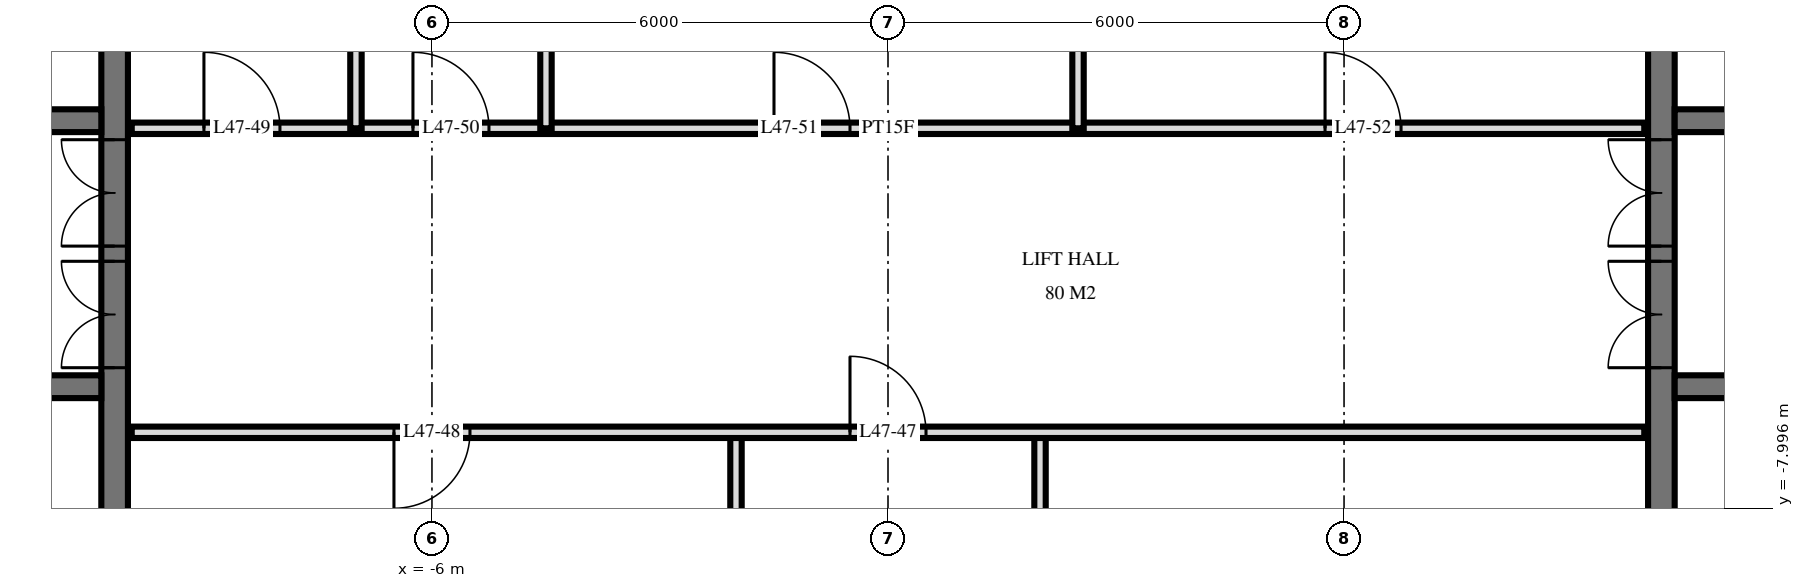
"""IFC4 building model, lengths in metres.
Left out: names, types, materials, properties, quantities, classifications, styles, units other than length and angle.
Written with IfcOpenShell. Run it as: python <this file> out.ifc"""

import sys

from ifc_helpers import new_model, si_unit, direction, frame, frame_2d, origin, place, context, subcontext, project, spatial, rectangle, extrude, element, fill, save


model = new_model("IFC4")
c1 = context("Model", 3, precision=1e-05, world=origin(), true_north=direction((0.0, 1.0)))
c2 = subcontext(c1, "Body", "Model", "MODEL_VIEW")
j1 = project(units=[si_unit("LENGTHUNIT", "METRE"), si_unit("PLANEANGLEUNIT", "RADIAN")], contexts=[c1])
p1 = place(None, origin())
s1 = spatial("IfcSite", under=j1, at=p1, CompositionType="ELEMENT")
p2 = place(p1, origin())
s2 = spatial("IfcBuilding", under=s1, at=p2, CompositionType="ELEMENT")
p3 = place(p2, frame((0.0, 0.0, 183.6)))
s3 = spatial("IfcBuildingStorey", under=s2, at=p3, CompositionType="ELEMENT", Elevation=183.6)
p4 = place(p3, frame((-10.175, -14.55, 0.0), z_axis=(0.0, 0.0, 1.0), x_axis=(0.0, 1.0, 0.0)))
e1 = element("IfcWall", 1, at=p4, inside=s3, PredefinedType="SHEAR", context=c2, shape_type="SweptSolid", body=[
    extrude(rectangle(XDim=14.1, YDim=0.35, at=frame_2d((7.05, 0.0))), origin(), (0.0, 0.0, 1.0), 3.5),
])
p5 = place(p4, frame((8.4, 0.0, 0.0)))
e2 = element("IfcOpeningElement", 2, at=p5, cuts=e1, PredefinedType="OPENING", context=c2, shape_type="SweptSolid", body=[
    extrude(rectangle(XDim=1.4, YDim=2.4, at=frame_2d((0.7, 1.2))), frame((0.0, 0.185, 0.0), z_axis=(0.0, -1.0, 0.0), x_axis=(1.0, 0.0, 0.0)), (0.0, 0.0, 1.0), 0.37),
])
p6 = place(p4, frame((10.0, 0.0, 0.0)))
e3 = element("IfcOpeningElement", 3, at=p6, cuts=e1, PredefinedType="OPENING", context=c2, shape_type="SweptSolid", body=[
    extrude(rectangle(XDim=1.4, YDim=2.4, at=frame_2d((0.7, 1.2))), frame((0.0, 0.185, 0.0), z_axis=(0.0, -1.0, 0.0), x_axis=(1.0, 0.0, 0.0)), (0.0, 0.0, 1.0), 0.37),
])
p7 = place(p4, frame((4.0, 0.0, 0.0)))
e4 = element("IfcOpeningElement", 4, at=p7, cuts=e1, PredefinedType="OPENING", context=c2, shape_type="SweptSolid", body=[
    extrude(rectangle(XDim=1.2, YDim=2.1, at=frame_2d((0.6, 1.05))), frame((0.0, 0.185, 0.0), z_axis=(0.0, -1.0, 0.0), x_axis=(1.0, 0.0, 0.0)), (0.0, 0.0, 1.0), 0.37),
])
p8 = place(p3, frame((-24.05, -2.9, 0.0), z_axis=(0.0, 0.0, 1.0), x_axis=(1.0, 0.0, 0.0)))
e5 = element("IfcWall", 5, at=p8, inside=s3, PredefinedType="SHEAR", context=c2, shape_type="SweptSolid", body=[
    extrude(rectangle(XDim=13.7, YDim=0.3, at=frame_2d((6.85, 0.0))), origin(), (0.0, 0.0, 1.0), 3.5),
])
p9 = place(p8, frame((0.55, 0.0, 0.0)))
e6 = element("IfcOpeningElement", 6, at=p9, cuts=e5, PredefinedType="OPENING", context=c2, shape_type="SweptSolid", body=[
    extrude(rectangle(XDim=1.1, YDim=2.1, at=frame_2d((0.55, 1.05))), frame((0.0, 0.16, 0.0), z_axis=(0.0, -1.0, 0.0), x_axis=(1.0, 0.0, 0.0)), (0.0, 0.0, 1.0), 0.32),
])
p10 = place(p8, frame((5.9, 0.0, 0.0)))
e7 = element("IfcOpeningElement", 7, at=p10, cuts=e5, PredefinedType="OPENING", context=c2, shape_type="SweptSolid", body=[
    extrude(rectangle(XDim=0.9, YDim=2.1, at=frame_2d((0.45, 1.05))), frame((0.0, 0.16, 0.0), z_axis=(0.0, -1.0, 0.0), x_axis=(1.0, 0.0, 0.0)), (0.0, 0.0, 1.0), 0.32),
])
p11 = place(p8, frame((11.85, 0.0, 0.0)))
e8 = element("IfcOpeningElement", 8, at=p11, cuts=e5, PredefinedType="OPENING", context=c2, shape_type="SweptSolid", body=[
    extrude(rectangle(XDim=1.0, YDim=2.1, at=frame_2d((0.5, 1.05))), frame((0.0, 0.16, 0.0), z_axis=(0.0, -1.0, 0.0), x_axis=(1.0, 0.0, 0.0)), (0.0, 0.0, 1.0), 0.32),
])
p12 = place(p8, frame((9.312, 0.0, 0.0)))
e9 = element("IfcOpeningElement", 9, at=p12, cuts=e5, PredefinedType="OPENING", context=c2, shape_type="SweptSolid", body=[
    extrude(rectangle(XDim=1.0, YDim=2.1, at=frame_2d((0.5, 1.05))), frame((0.0, 0.16, 0.0), z_axis=(0.0, -1.0, 0.0), x_axis=(1.0, 0.0, 0.0)), (0.0, 0.0, 1.0), 0.32),
])
p13 = place(p8, frame((7.887, 0.0, 0.0)))
e10 = element("IfcOpeningElement", 10, at=p13, cuts=e5, PredefinedType="OPENING", context=c2, shape_type="SweptSolid", body=[
    extrude(rectangle(XDim=1.0, YDim=2.1, at=frame_2d((0.5, 1.05))), frame((0.0, 0.16, 0.0), z_axis=(0.0, -1.0, 0.0), x_axis=(1.0, 0.0, 0.0)), (0.0, 0.0, 1.0), 0.32),
])
p14 = place(p8, frame((3.0, 0.0, 0.0)))
e11 = element("IfcOpeningElement", 11, at=p14, cuts=e5, PredefinedType="OPENING", context=c2, shape_type="SweptSolid", body=[
    extrude(rectangle(XDim=1.0, YDim=2.1, at=frame_2d((0.5, 1.05))), frame((0.0, 0.16, 0.0), z_axis=(0.0, -1.0, 0.0), x_axis=(1.0, 0.0, 0.0)), (0.0, 0.0, 1.0), 0.32),
])
p15 = place(p3, frame((-24.05, -6.4, 0.0), z_axis=(0.0, 0.0, 1.0), x_axis=(1.0, 0.0, 0.0)))
e12 = element("IfcWall", 12, at=p15, inside=s3, PredefinedType="SHEAR", context=c2, shape_type="SweptSolid", body=[
    extrude(rectangle(XDim=13.7, YDim=0.3, at=frame_2d((6.85, 0.0))), origin(), (0.0, 0.0, 1.0), 3.5),
])
p16 = place(p15, frame((0.55, 0.0, 0.0)))
e13 = element("IfcOpeningElement", 13, at=p16, cuts=e12, PredefinedType="OPENING", context=c2, shape_type="SweptSolid", body=[
    extrude(rectangle(XDim=1.1, YDim=2.1, at=frame_2d((0.55, 1.05))), frame((0.0, 0.16, 0.0), z_axis=(0.0, -1.0, 0.0), x_axis=(1.0, 0.0, 0.0)), (0.0, 0.0, 1.0), 0.32),
])
p17 = place(p15, frame((5.8, 0.0, 0.0)))
e14 = element("IfcOpeningElement", 14, at=p17, cuts=e12, PredefinedType="OPENING", context=c2, shape_type="SweptSolid", body=[
    extrude(rectangle(XDim=1.1, YDim=2.1, at=frame_2d((0.55, 1.05))), frame((0.0, 0.16, 0.0), z_axis=(0.0, -1.0, 0.0), x_axis=(1.0, 0.0, 0.0)), (0.0, 0.0, 1.0), 0.32),
])
p18 = place(p3, frame((10.175, -14.55, 0.0), z_axis=(0.0, 0.0, 1.0), x_axis=(0.0, 1.0, 0.0)))
e15 = element("IfcWall", 15, at=p18, inside=s3, PredefinedType="SHEAR", context=c2, shape_type="SweptSolid", body=[
    extrude(rectangle(XDim=14.1, YDim=0.35, at=frame_2d((7.05, 0.0))), origin(), (0.0, 0.0, 1.0), 3.5),
])
p19 = place(p18, frame((8.4, 0.0, 0.0)))
e16 = element("IfcOpeningElement", 16, at=p19, cuts=e15, PredefinedType="OPENING", context=c2, shape_type="SweptSolid", body=[
    extrude(rectangle(XDim=1.4, YDim=2.4, at=frame_2d((0.7, 1.2))), frame((0.0, 0.185, 0.0), z_axis=(0.0, -1.0, 0.0), x_axis=(1.0, 0.0, 0.0)), (0.0, 0.0, 1.0), 0.37),
])
p20 = place(p18, frame((10.0, 0.0, 0.0)))
e17 = element("IfcOpeningElement", 17, at=p20, cuts=e15, PredefinedType="OPENING", context=c2, shape_type="SweptSolid", body=[
    extrude(rectangle(XDim=1.4, YDim=2.4, at=frame_2d((0.7, 1.2))), frame((0.0, 0.185, 0.0), z_axis=(0.0, -1.0, 0.0), x_axis=(1.0, 0.0, 0.0)), (0.0, 0.0, 1.0), 0.37),
])
p21 = place(p18, frame((4.0, 0.0, 0.0)))
e18 = element("IfcOpeningElement", 18, at=p21, cuts=e15, PredefinedType="OPENING", context=c2, shape_type="SweptSolid", body=[
    extrude(rectangle(XDim=1.2, YDim=2.1, at=frame_2d((0.6, 1.05))), frame((0.0, 0.185, 0.0), z_axis=(0.0, -1.0, 0.0), x_axis=(1.0, 0.0, 0.0)), (0.0, 0.0, 1.0), 0.37),
])
p22 = place(p3, frame((10.35, -2.9, 0.0), z_axis=(0.0, 0.0, 1.0), x_axis=(1.0, 0.0, 0.0)))
e19 = element("IfcWall", 19, at=p22, inside=s3, PredefinedType="SHEAR", context=c2, shape_type="SweptSolid", body=[
    extrude(rectangle(XDim=13.7, YDim=0.3, at=frame_2d((6.85, 0.0))), origin(), (0.0, 0.0, 1.0), 3.5),
])
p23 = place(p22, frame((12.05, 0.0, 0.0)))
e20 = element("IfcOpeningElement", 20, at=p23, cuts=e19, PredefinedType="OPENING", context=c2, shape_type="SweptSolid", body=[
    extrude(rectangle(XDim=1.1, YDim=2.1, at=frame_2d((0.55, 1.05))), frame((0.0, 0.16, 0.0), z_axis=(0.0, -1.0, 0.0), x_axis=(1.0, 0.0, 0.0)), (0.0, 0.0, 1.0), 0.32),
])
p24 = place(p22, frame((6.9, 0.0, 0.0)))
e21 = element("IfcOpeningElement", 21, at=p24, cuts=e19, PredefinedType="OPENING", context=c2, shape_type="SweptSolid", body=[
    extrude(rectangle(XDim=0.9, YDim=2.1, at=frame_2d((0.45, 1.05))), frame((0.0, 0.16, 0.0), z_axis=(0.0, -1.0, 0.0), x_axis=(1.0, 0.0, 0.0)), (0.0, 0.0, 1.0), 0.32),
])
p25 = place(p22, frame((0.85, 0.0, 0.0)))
e22 = element("IfcOpeningElement", 22, at=p25, cuts=e19, PredefinedType="OPENING", context=c2, shape_type="SweptSolid", body=[
    extrude(rectangle(XDim=1.0, YDim=2.1, at=frame_2d((0.5, 1.05))), frame((0.0, 0.16, 0.0), z_axis=(0.0, -1.0, 0.0), x_axis=(1.0, 0.0, 0.0)), (0.0, 0.0, 1.0), 0.32),
])
p26 = place(p22, frame((3.387, 0.0, 0.0)))
e23 = element("IfcOpeningElement", 23, at=p26, cuts=e19, PredefinedType="OPENING", context=c2, shape_type="SweptSolid", body=[
    extrude(rectangle(XDim=1.0, YDim=2.1, at=frame_2d((0.5, 1.05))), frame((0.0, 0.16, 0.0), z_axis=(0.0, -1.0, 0.0), x_axis=(1.0, 0.0, 0.0)), (0.0, 0.0, 1.0), 0.32),
])
p27 = place(p22, frame((4.812, 0.0, 0.0)))
e24 = element("IfcOpeningElement", 24, at=p27, cuts=e19, PredefinedType="OPENING", context=c2, shape_type="SweptSolid", body=[
    extrude(rectangle(XDim=1.0, YDim=2.1, at=frame_2d((0.5, 1.05))), frame((0.0, 0.16, 0.0), z_axis=(0.0, -1.0, 0.0), x_axis=(1.0, 0.0, 0.0)), (0.0, 0.0, 1.0), 0.32),
])
p28 = place(p22, frame((9.7, 0.0, 0.0)))
e25 = element("IfcOpeningElement", 25, at=p28, cuts=e19, PredefinedType="OPENING", context=c2, shape_type="SweptSolid", body=[
    extrude(rectangle(XDim=1.0, YDim=2.1, at=frame_2d((0.5, 1.05))), frame((0.0, 0.16, 0.0), z_axis=(0.0, -1.0, 0.0), x_axis=(1.0, 0.0, 0.0)), (0.0, 0.0, 1.0), 0.32),
])
p29 = place(p3, frame((10.35, -6.4, 0.0), z_axis=(0.0, 0.0, 1.0), x_axis=(1.0, 0.0, 0.0)))
e26 = element("IfcWall", 26, at=p29, inside=s3, PredefinedType="SHEAR", context=c2, shape_type="SweptSolid", body=[
    extrude(rectangle(XDim=13.7, YDim=0.3, at=frame_2d((6.85, 0.0))), origin(), (0.0, 0.0, 1.0), 3.5),
])
p30 = place(p29, frame((12.05, 0.0, 0.0)))
e27 = element("IfcOpeningElement", 27, at=p30, cuts=e26, PredefinedType="OPENING", context=c2, shape_type="SweptSolid", body=[
    extrude(rectangle(XDim=1.1, YDim=2.1, at=frame_2d((0.55, 1.05))), frame((0.0, 0.16, 0.0), z_axis=(0.0, -1.0, 0.0), x_axis=(1.0, 0.0, 0.0)), (0.0, 0.0, 1.0), 0.32),
])
p31 = place(p29, frame((6.8, 0.0, 0.0)))
e28 = element("IfcOpeningElement", 28, at=p31, cuts=e26, PredefinedType="OPENING", context=c2, shape_type="SweptSolid", body=[
    extrude(rectangle(XDim=1.1, YDim=2.1, at=frame_2d((0.55, 1.05))), frame((0.0, 0.16, 0.0), z_axis=(0.0, -1.0, 0.0), x_axis=(1.0, 0.0, 0.0)), (0.0, 0.0, 1.0), 0.32),
])
p32 = place(p3, frame((2.5, -3.0, 0.0), z_axis=(0.0, 0.0, 1.0), x_axis=(0.0, 1.0, 0.0)))
e29 = element("IfcWall", 29, at=p32, inside=s3, PredefinedType="PARTITIONING", context=c2, shape_type="SweptSolid", body=[
    extrude(rectangle(XDim=4.02, YDim=0.15, at=frame_2d((2.01, 0.0))), origin(), (0.0, 0.0, 1.0), 3.22),
])
for number, where, z_axis, x_axis in (
    (30, (2.0, -11.0, 0.0), (0.0, 0.0, 1.0), (0.0, 1.0, 0.0)),
    (31, (-2.0, -11.0, 0.0), (0.0, 0.0, 1.0), (0.0, 1.0, 0.0)),
):
    element("IfcWall", number, at=place(p3, frame(where, z_axis=z_axis, x_axis=x_axis)), inside=s3, PredefinedType="PARTITIONING", context=c2, shape_type="SweptSolid", body=[
        extrude(rectangle(XDim=4.0, YDim=0.15, at=frame_2d((2.0, 0.0))), origin(), (0.0, 0.0, 1.0), 3.22),
    ])
for number, where, z_axis, x_axis in (
    (32, (-4.5, -3.0, 0.0), (0.0, 0.0, 1.0), (0.0, 1.0, 0.0)),
    (33, (-7.0, -3.0, 0.0), (0.0, 0.0, 1.0), (0.0, 1.0, 0.0)),
):
    element("IfcWall", number, at=place(p3, frame(where, z_axis=z_axis, x_axis=x_axis)), inside=s3, PredefinedType="PLUMBINGWALL", context=c2, shape_type="SweptSolid", body=[
        extrude(rectangle(XDim=4.02, YDim=0.15, at=frame_2d((2.01, 0.0))), origin(), (0.0, 0.0, 1.0), 3.22),
    ])
p33 = place(p3, frame((-9.95, -7.0, 0.0), z_axis=(0.0, 0.0, 1.0), x_axis=(1.0, 0.0, 0.0)))
e34 = element("IfcWall", 34, at=p33, inside=s3, PredefinedType="PARTITIONING", context=c2, shape_type="SweptSolid", body=[
    extrude(rectangle(XDim=19.9, YDim=0.15, at=frame_2d((9.95, 0.0))), origin(), (0.0, 0.0, 1.0), 3.22),
])
p34 = place(p33, frame((9.45, 0.0, 0.0)))
e35 = element("IfcOpeningElement", 35, at=p34, cuts=e34, PredefinedType="OPENING", context=c2, shape_type="SweptSolid", body=[
    extrude(rectangle(XDim=1.0, YDim=2.1, at=frame_2d((0.5, 1.05))), frame((0.0, 0.085, 0.0), z_axis=(0.0, -1.0, 0.0), x_axis=(1.0, 0.0, 0.0)), (0.0, 0.0, 1.0), 0.17),
])
p35 = place(p33, frame((3.45, 0.0, 0.0)))
e36 = element("IfcOpeningElement", 36, at=p35, cuts=e34, PredefinedType="OPENING", context=c2, shape_type="SweptSolid", body=[
    extrude(rectangle(XDim=1.0, YDim=2.1, at=frame_2d((0.5, 1.05))), frame((0.0, 0.085, 0.0), z_axis=(0.0, -1.0, 0.0), x_axis=(1.0, 0.0, 0.0)), (0.0, 0.0, 1.0), 0.17),
])
p36 = place(p3, frame((-9.95, -3.0, 0.0), z_axis=(0.0, 0.0, 1.0), x_axis=(1.0, 0.0, 0.0)))
e37 = element("IfcWall", 37, at=p36, inside=s3, PredefinedType="PARTITIONING", context=c2, shape_type="SweptSolid", body=[
    extrude(rectangle(XDim=19.9, YDim=0.15, at=frame_2d((9.95, 0.0))), origin(), (0.0, 0.0, 1.0), 3.22),
])
p37 = place(p36, frame((0.95, 0.0, 0.0)))
e38 = element("IfcOpeningElement", 38, at=p37, cuts=e37, PredefinedType="OPENING", context=c2, shape_type="SweptSolid", body=[
    extrude(rectangle(XDim=1.0, YDim=2.1, at=frame_2d((0.5, 1.05))), frame((0.0, 0.085, 0.0), z_axis=(0.0, -1.0, 0.0), x_axis=(1.0, 0.0, 0.0)), (0.0, 0.0, 1.0), 0.17),
])
p38 = place(p36, frame((3.7, 0.0, 0.0)))
e39 = element("IfcOpeningElement", 39, at=p38, cuts=e37, PredefinedType="OPENING", context=c2, shape_type="SweptSolid", body=[
    extrude(rectangle(XDim=1.0, YDim=2.1, at=frame_2d((0.5, 1.05))), frame((0.0, 0.085, 0.0), z_axis=(0.0, -1.0, 0.0), x_axis=(1.0, 0.0, 0.0)), (0.0, 0.0, 1.0), 0.17),
])
p39 = place(p36, frame((8.45, 0.0, 0.0)))
e40 = element("IfcOpeningElement", 40, at=p39, cuts=e37, PredefinedType="OPENING", context=c2, shape_type="SweptSolid", body=[
    extrude(rectangle(XDim=1.0, YDim=2.1, at=frame_2d((0.5, 1.05))), frame((0.0, 0.085, 0.0), z_axis=(0.0, -1.0, 0.0), x_axis=(1.0, 0.0, 0.0)), (0.0, 0.0, 1.0), 0.17),
])
p40 = place(p36, frame((15.7, 0.0, 0.0)))
e41 = element("IfcOpeningElement", 41, at=p40, cuts=e37, PredefinedType="OPENING", context=c2, shape_type="SweptSolid", body=[
    extrude(rectangle(XDim=1.0, YDim=2.1, at=frame_2d((0.5, 1.05))), frame((0.0, 0.085, 0.0), z_axis=(0.0, -1.0, 0.0), x_axis=(1.0, 0.0, 0.0)), (0.0, 0.0, 1.0), 0.17),
])
p41 = place(p5, origin())
e42 = element("IfcDoor", 42, at=p41, inside=s3, OperationType="DOUBLE_DOOR_SINGLE_SWING", PredefinedType="DOOR", context=c2, shape_type="SweptSolid", body=[
    extrude(rectangle(XDim=1.4, YDim=2.4, at=frame_2d((0.7, 1.2))), frame((0.0, 0.025, 0.0), z_axis=(0.0, -1.0, 0.0), x_axis=(1.0, 0.0, 0.0)), (0.0, 0.0, 1.0), 0.05),
])
fill(e2, e42)
p42 = place(p6, origin())
e43 = element("IfcDoor", 43, at=p42, inside=s3, OperationType="DOUBLE_DOOR_SINGLE_SWING", PredefinedType="DOOR", context=c2, shape_type="SweptSolid", body=[
    extrude(rectangle(XDim=1.4, YDim=2.4, at=frame_2d((0.7, 1.2))), frame((0.0, 0.025, 0.0), z_axis=(0.0, -1.0, 0.0), x_axis=(1.0, 0.0, 0.0)), (0.0, 0.0, 1.0), 0.05),
])
fill(e3, e43)
p43 = place(p19, origin())
e44 = element("IfcDoor", 44, at=p43, inside=s3, OperationType="DOUBLE_DOOR_SINGLE_SWING", PredefinedType="DOOR", context=c2, shape_type="SweptSolid", body=[
    extrude(rectangle(XDim=1.4, YDim=2.4, at=frame_2d((0.7, 1.2))), frame((0.0, 0.025, 0.0), z_axis=(0.0, -1.0, 0.0), x_axis=(1.0, 0.0, 0.0)), (0.0, 0.0, 1.0), 0.05),
])
fill(e16, e44)
p44 = place(p20, origin())
e45 = element("IfcDoor", 45, at=p44, inside=s3, OperationType="DOUBLE_DOOR_SINGLE_SWING", PredefinedType="DOOR", context=c2, shape_type="SweptSolid", body=[
    extrude(rectangle(XDim=1.4, YDim=2.4, at=frame_2d((0.7, 1.2))), frame((0.0, 0.025, 0.0), z_axis=(0.0, -1.0, 0.0), x_axis=(1.0, 0.0, 0.0)), (0.0, 0.0, 1.0), 0.05),
])
fill(e17, e45)
p45 = place(p34, origin())
e46 = element("IfcDoor", 46, at=p45, inside=s3, OperationType="SINGLE_SWING_RIGHT", PredefinedType="DOOR", context=c2, shape_type="SweptSolid", body=[
    extrude(rectangle(XDim=1.0, YDim=2.1, at=frame_2d((0.5, 1.05))), frame((0.0, 0.025, 0.0), z_axis=(0.0, -1.0, 0.0), x_axis=(1.0, 0.0, 0.0)), (0.0, 0.0, 1.0), 0.05),
])
fill(e35, e46)
p46 = place(p35, frame((0.5, 0.0, 0.0), z_axis=(0.0, 0.0, 1.0), x_axis=(-1.0, 0.0, 0.0)))
e47 = element("IfcDoor", 47, at=p46, inside=s3, OperationType="SINGLE_SWING_LEFT", PredefinedType="DOOR", context=c2, shape_type="SweptSolid", body=[
    extrude(rectangle(XDim=1.0, YDim=2.1, at=frame_2d((0.0, 1.05))), frame((0.0, -0.025, 0.0), z_axis=(0.0, 1.0, 0.0), x_axis=(-1.0, 0.0, 0.0)), (0.0, 0.0, 1.0), 0.05),
])
fill(e36, e47)
p47 = place(p37, origin())
e48 = element("IfcDoor", 48, at=p47, inside=s3, OperationType="SINGLE_SWING_RIGHT", PredefinedType="DOOR", context=c2, shape_type="SweptSolid", body=[
    extrude(rectangle(XDim=1.0, YDim=2.1, at=frame_2d((0.5, 1.05))), frame((0.0, 0.025, 0.0), z_axis=(0.0, -1.0, 0.0), x_axis=(1.0, 0.0, 0.0)), (0.0, 0.0, 1.0), 0.05),
])
fill(e38, e48)
p48 = place(p38, origin())
e49 = element("IfcDoor", 49, at=p48, inside=s3, OperationType="SINGLE_SWING_RIGHT", PredefinedType="DOOR", context=c2, shape_type="SweptSolid", body=[
    extrude(rectangle(XDim=1.0, YDim=2.1, at=frame_2d((0.5, 1.05))), frame((0.0, 0.025, 0.0), z_axis=(0.0, -1.0, 0.0), x_axis=(1.0, 0.0, 0.0)), (0.0, 0.0, 1.0), 0.05),
])
fill(e39, e49)
p49 = place(p39, origin())
e50 = element("IfcDoor", 50, at=p49, inside=s3, OperationType="SINGLE_SWING_RIGHT", PredefinedType="DOOR", context=c2, shape_type="SweptSolid", body=[
    extrude(rectangle(XDim=1.0, YDim=2.1, at=frame_2d((0.5, 1.05))), frame((0.0, 0.025, 0.0), z_axis=(0.0, -1.0, 0.0), x_axis=(1.0, 0.0, 0.0)), (0.0, 0.0, 1.0), 0.05),
])
fill(e40, e50)
p50 = place(p40, origin())
e51 = element("IfcDoor", 51, at=p50, inside=s3, OperationType="SINGLE_SWING_RIGHT", PredefinedType="DOOR", context=c2, shape_type="SweptSolid", body=[
    extrude(rectangle(XDim=1.0, YDim=2.1, at=frame_2d((0.5, 1.05))), frame((0.0, 0.025, 0.0), z_axis=(0.0, -1.0, 0.0), x_axis=(1.0, 0.0, 0.0)), (0.0, 0.0, 1.0), 0.05),
])
fill(e41, e51)
save(model, sys.argv[1])
